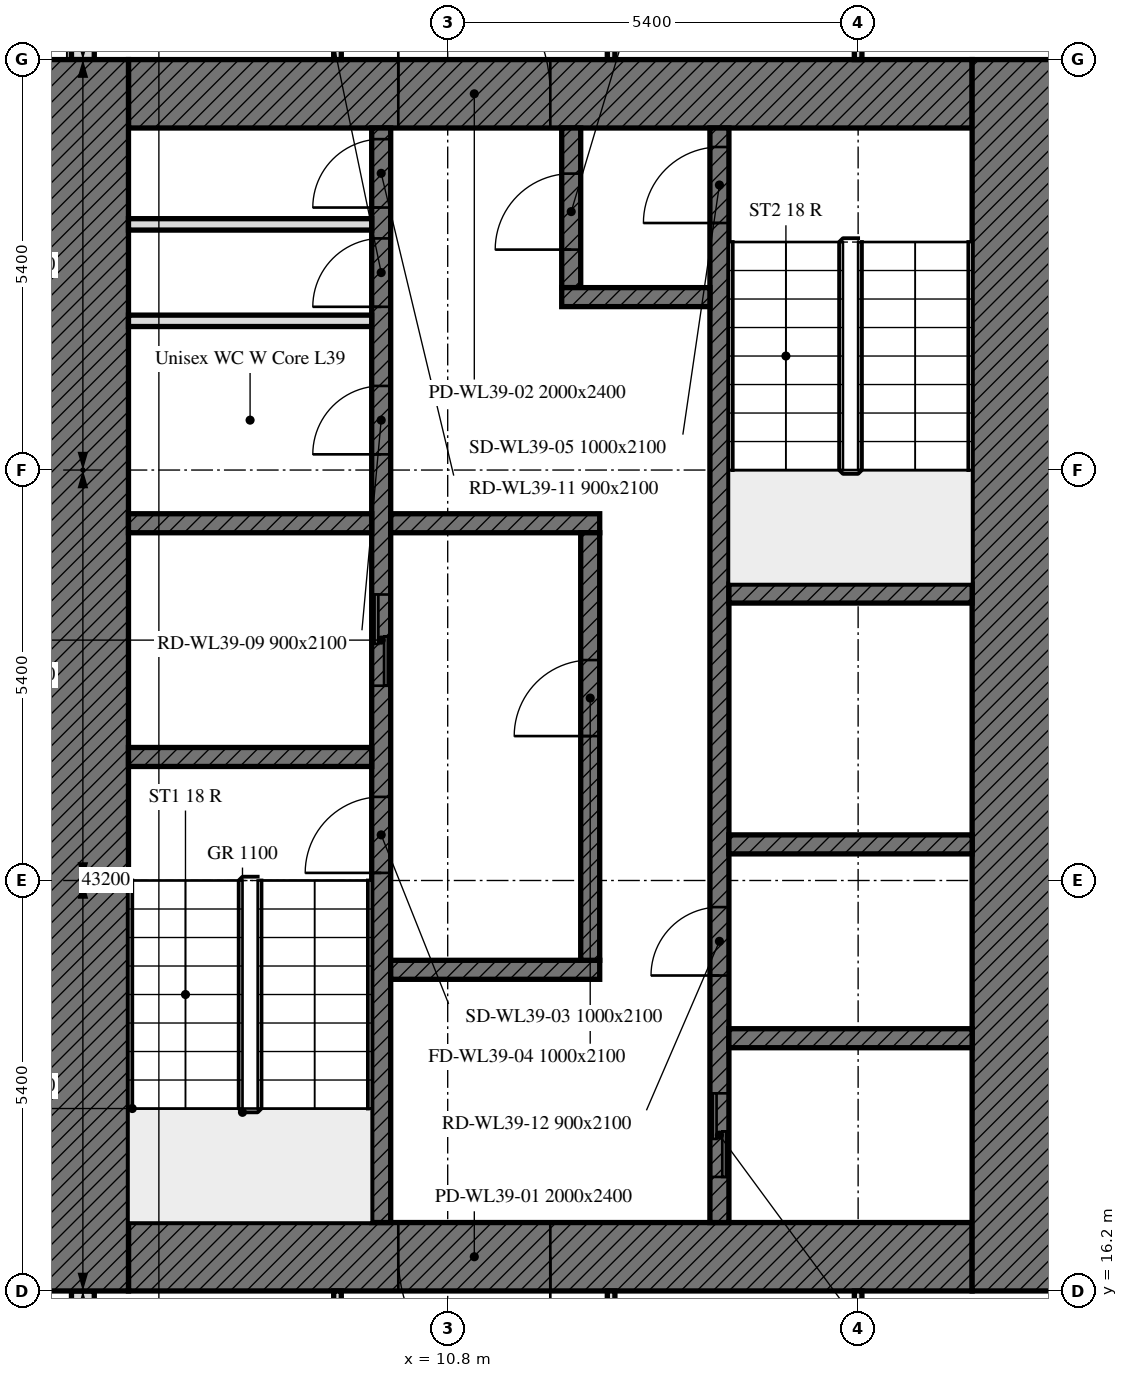
"""IFC4 building model, lengths in metres.
Left out: names, types, materials, properties, quantities, classifications, styles, units other than length and angle.
Written with IfcOpenShell. Run it as: python <this file> out.ifc"""

import sys

from ifc_helpers import new_model, si_unit, direction, frame, frame_2d, origin, place, context, subcontext, project, spatial, rectangle, extrude, element, fill, save


model = new_model("IFC4")
c1 = context("Model", 3, precision=1e-05, world=origin(), true_north=direction((0.0, 1.0)))
c2 = subcontext(c1, "Body", "Model", "MODEL_VIEW")
j1 = project(units=[si_unit("LENGTHUNIT", "METRE"), si_unit("PLANEANGLEUNIT", "RADIAN")], contexts=[c1])
p1 = place(None, origin())
s1 = spatial("IfcSite", under=j1, at=p1, CompositionType="ELEMENT")
p2 = place(p1, origin())
s2 = spatial("IfcBuilding", under=s1, at=p2, CompositionType="ELEMENT")
p3 = place(p2, frame((0.0, 0.0, 166.0)))
s3 = spatial("IfcBuildingStorey", under=s2, at=p3, CompositionType="ELEMENT", Elevation=166.0)
p4 = place(p3, frame((6.0, 37.614, 0.0), z_axis=(0.0, 0.0, 1.0), x_axis=(0.0, -1.0, 0.0)))
e1 = element("IfcWall", 1, at=p4, inside=s3, PredefinedType="SOLIDWALL", context=c2, shape_type="SweptSolid", body=[
    extrude(rectangle(XDim=5.214, YDim=0.3, at=frame_2d((2.607, 0.0))), origin(), (0.0, 0.0, 1.0), 3.0),
])
p5 = place(p4, frame((1.164, 0.0, 0.9)))
e2 = element("IfcOpeningElement", 2, at=p5, cuts=e1, PredefinedType="OPENING", context=c2, shape_type="SweptSolid", body=[
    extrude(rectangle(XDim=1.1, YDim=1.7, at=frame_2d((0.55, 0.85))), frame((0.0, 0.16, 0.0), z_axis=(0.0, -1.0, 0.0), x_axis=(1.0, 0.0, 0.0)), (0.0, 0.0, 1.0), 0.32),
])
p6 = place(p4, frame((2.764, 0.0, 0.9)))
e3 = element("IfcOpeningElement", 3, at=p6, cuts=e1, PredefinedType="OPENING", context=c2, shape_type="SweptSolid", body=[
    extrude(rectangle(XDim=1.1, YDim=1.7, at=frame_2d((0.55, 0.85))), frame((0.0, 0.16, 0.0), z_axis=(0.0, -1.0, 0.0), x_axis=(1.0, 0.0, 0.0)), (0.0, 0.0, 1.0), 0.32),
])
p7 = place(p3, frame((6.0, 16.2, 0.0), z_axis=(0.0, 0.0, 1.0), x_axis=(0.0, -1.0, 0.0)))
e4 = element("IfcWall", 4, at=p7, inside=s3, PredefinedType="SOLIDWALL", context=c2, shape_type="SweptSolid", body=[
    extrude(rectangle(XDim=10.614, YDim=0.3, at=frame_2d((5.307, 0.0))), origin(), (0.0, 0.0, 1.0), 3.0),
])
p8 = place(p7, frame((1.0, 0.0, 0.9)))
e5 = element("IfcOpeningElement", 5, at=p8, cuts=e4, PredefinedType="OPENING", context=c2, shape_type="SweptSolid", body=[
    extrude(rectangle(XDim=3.4, YDim=1.7, at=frame_2d((1.7, 0.85))), frame((0.0, 0.16, 0.0), z_axis=(0.0, -1.0, 0.0), x_axis=(1.0, 0.0, 0.0)), (0.0, 0.0, 1.0), 0.32),
])
p9 = place(p7, frame((6.75, 0.0, 0.9)))
e6 = element("IfcOpeningElement", 6, at=p9, cuts=e4, PredefinedType="OPENING", context=c2, shape_type="SweptSolid", body=[
    extrude(rectangle(XDim=1.1, YDim=1.7, at=frame_2d((0.55, 0.85))), frame((0.0, 0.16, 0.0), z_axis=(0.0, -1.0, 0.0), x_axis=(1.0, 0.0, 0.0)), (0.0, 0.0, 1.0), 0.32),
])
p10 = place(p7, frame((8.35, 0.0, 0.9)))
e7 = element("IfcOpeningElement", 7, at=p10, cuts=e4, PredefinedType="OPENING", context=c2, shape_type="SweptSolid", body=[
    extrude(rectangle(XDim=1.1, YDim=1.7, at=frame_2d((0.55, 0.85))), frame((0.0, 0.16, 0.0), z_axis=(0.0, -1.0, 0.0), x_axis=(1.0, 0.0, 0.0)), (0.0, 0.0, 1.0), 0.32),
])
p11 = place(p3, frame((17.7, 16.65, 0.0), z_axis=(0.0, 0.0, 1.0), x_axis=(-1.0, 0.0, 0.0)))
e8 = element("IfcWall", 8, at=p11, inside=s3, PredefinedType="SOLIDWALL", context=c2, shape_type="SweptSolid", body=[
    extrude(rectangle(XDim=11.1, YDim=0.9, at=frame_2d((5.55, 0.0))), origin(), (0.0, 0.0, 1.0), 3.0),
])
p12 = place(p11, frame((5.55, 0.0, 0.0)))
e9 = element("IfcOpeningElement", 9, at=p12, cuts=e8, PredefinedType="OPENING", context=c2, shape_type="SweptSolid", body=[
    extrude(rectangle(XDim=2.0, YDim=2.4, at=frame_2d((1.0, 1.2))), frame((0.0, 0.45, 0.0), z_axis=(0.0, -1.0, 0.0), x_axis=(1.0, 0.0, 0.0)), (0.0, 0.0, 1.0), 0.9),
])
p13 = place(p3, frame((6.6, 31.95, 0.0), z_axis=(0.0, 0.0, 1.0), x_axis=(1.0, 0.0, 0.0)))
e10 = element("IfcWall", 10, at=p13, inside=s3, PredefinedType="SOLIDWALL", context=c2, shape_type="SweptSolid", body=[
    extrude(rectangle(XDim=11.1, YDim=0.9, at=frame_2d((5.55, 0.0))), origin(), (0.0, 0.0, 1.0), 3.0),
])
p14 = place(p13, frame((3.55, 0.0, 0.0)))
e11 = element("IfcOpeningElement", 11, at=p14, cuts=e10, PredefinedType="OPENING", context=c2, shape_type="SweptSolid", body=[
    extrude(rectangle(XDim=2.0, YDim=2.4, at=frame_2d((1.0, 1.2))), frame((0.0, 0.45, 0.0), z_axis=(0.0, -1.0, 0.0), x_axis=(1.0, 0.0, 0.0)), (0.0, 0.0, 1.0), 0.9),
])
for number, where, z_axis, x_axis in (
    (12, (6.0, 16.2, 0.0), (0.0, 0.0, 1.0), (0.0, 1.0, 0.0)),
    (13, (18.3, 32.4, 0.0), (0.0, 0.0, 1.0), (0.0, -1.0, 0.0)),
):
    element("IfcWall", number, at=place(p3, frame(where, z_axis=z_axis, x_axis=x_axis)), inside=s3, PredefinedType="SOLIDWALL", context=c2, shape_type="SweptSolid", body=[
        extrude(rectangle(XDim=16.2, YDim=1.2, at=frame_2d((8.1, 0.0))), origin(), (0.0, 0.0, 1.0), 3.0),
    ])
p15 = place(p3, frame((9.925, 17.1, 0.0), z_axis=(0.0, 0.0, 1.0), x_axis=(0.0, 1.0, 0.0)))
e14 = element("IfcWall", 14, at=p15, inside=s3, PredefinedType="SOLIDWALL", context=c2, shape_type="SweptSolid", body=[
    extrude(rectangle(XDim=14.4, YDim=0.25, at=frame_2d((7.2, 0.0))), origin(), (0.0, 0.0, 1.0), 3.0),
])
p16 = place(p15, frame((4.6, 0.0, 0.0)))
e15 = element("IfcOpeningElement", 15, at=p16, cuts=e14, PredefinedType="OPENING", context=c2, shape_type="SweptSolid", body=[
    extrude(rectangle(XDim=1.0, YDim=2.1, at=frame_2d((0.5, 1.05))), frame((0.0, 0.125, 0.0), z_axis=(0.0, -1.0, 0.0), x_axis=(1.0, 0.0, 0.0)), (0.0, 0.0, 1.0), 0.25),
])
p17 = place(p15, frame((7.062, 0.0, 0.0)))
e16 = element("IfcOpeningElement", 16, at=p17, cuts=e14, PredefinedType="OPENING", context=c2, shape_type="SweptSolid", body=[
    extrude(rectangle(XDim=1.2, YDim=2.1, at=frame_2d((0.6, 1.05))), frame((0.0, 0.125, 0.0), z_axis=(0.0, -1.0, 0.0), x_axis=(1.0, 0.0, 0.0)), (0.0, 0.0, 1.0), 0.25),
])
p18 = place(p15, frame((10.106, 0.0, 0.0)))
e17 = element("IfcOpeningElement", 17, at=p18, cuts=e14, PredefinedType="OPENING", context=c2, shape_type="SweptSolid", body=[
    extrude(rectangle(XDim=0.9, YDim=2.1, at=frame_2d((0.45, 1.05))), frame((0.0, 0.125, 0.0), z_axis=(0.0, -1.0, 0.0), x_axis=(1.0, 0.0, 0.0)), (0.0, 0.0, 1.0), 0.25),
])
p19 = place(p15, frame((12.048, 0.0, 0.0)))
e18 = element("IfcOpeningElement", 18, at=p19, cuts=e14, PredefinedType="OPENING", context=c2, shape_type="SweptSolid", body=[
    extrude(rectangle(XDim=0.9, YDim=2.1, at=frame_2d((0.45, 1.05))), frame((0.0, 0.125, 0.0), z_axis=(0.0, -1.0, 0.0), x_axis=(1.0, 0.0, 0.0)), (0.0, 0.0, 1.0), 0.25),
])
p20 = place(p15, frame((13.354, 0.0, 0.0)))
e19 = element("IfcOpeningElement", 19, at=p20, cuts=e14, PredefinedType="OPENING", context=c2, shape_type="SweptSolid", body=[
    extrude(rectangle(XDim=0.9, YDim=2.1, at=frame_2d((0.45, 1.05))), frame((0.0, 0.125, 0.0), z_axis=(0.0, -1.0, 0.0), x_axis=(1.0, 0.0, 0.0)), (0.0, 0.0, 1.0), 0.25),
])
p21 = place(p3, frame((14.375, 17.1, 0.0), z_axis=(0.0, 0.0, 1.0), x_axis=(0.0, 1.0, 0.0)))
e20 = element("IfcWall", 20, at=p21, inside=s3, PredefinedType="SOLIDWALL", context=c2, shape_type="SweptSolid", body=[
    extrude(rectangle(XDim=14.4, YDim=0.25, at=frame_2d((7.2, 0.0))), origin(), (0.0, 0.0, 1.0), 3.0),
])
p22 = place(p21, frame((13.15, 0.0, 0.0)))
e21 = element("IfcOpeningElement", 21, at=p22, cuts=e20, PredefinedType="OPENING", context=c2, shape_type="SweptSolid", body=[
    extrude(rectangle(XDim=1.0, YDim=2.1, at=frame_2d((0.5, 1.05))), frame((0.0, 0.125, 0.0), z_axis=(0.0, -1.0, 0.0), x_axis=(1.0, 0.0, 0.0)), (0.0, 0.0, 1.0), 0.25),
])
p23 = place(p21, frame((0.6, 0.0, 0.0)))
e22 = element("IfcOpeningElement", 22, at=p23, cuts=e20, PredefinedType="OPENING", context=c2, shape_type="SweptSolid", body=[
    extrude(rectangle(XDim=1.1, YDim=2.1, at=frame_2d((0.55, 1.05))), frame((0.0, 0.125, 0.0), z_axis=(0.0, -1.0, 0.0), x_axis=(1.0, 0.0, 0.0)), (0.0, 0.0, 1.0), 0.25),
])
p24 = place(p21, frame((3.25, 0.0, 0.0)))
e23 = element("IfcOpeningElement", 23, at=p24, cuts=e20, PredefinedType="OPENING", context=c2, shape_type="SweptSolid", body=[
    extrude(rectangle(XDim=0.9, YDim=2.1, at=frame_2d((0.45, 1.05))), frame((0.0, 0.125, 0.0), z_axis=(0.0, -1.0, 0.0), x_axis=(1.0, 0.0, 0.0)), (0.0, 0.0, 1.0), 0.25),
])
for number, where, z_axis, x_axis in (
    (24, (6.6, 23.225, 0.0), (0.0, 0.0, 1.0), (1.0, 0.0, 0.0)),
    (25, (14.5, 25.375, 0.0), (0.0, 0.0, 1.0), (1.0, 0.0, 0.0)),
    (26, (14.5, 22.075, 0.0), (0.0, 0.0, 1.0), (1.0, 0.0, 0.0)),
    (27, (6.6, 26.3, 0.0), (0.0, 0.0, 1.0), (1.0, 0.0, 0.0)),
):
    element("IfcWall", number, at=place(p3, frame(where, z_axis=z_axis, x_axis=x_axis)), inside=s3, PredefinedType="SOLIDWALL", context=c2, shape_type="SweptSolid", body=[
        extrude(rectangle(XDim=3.2, YDim=0.25, at=frame_2d((1.6, 0.0))), origin(), (0.0, 0.0, 1.0), 3.0),
    ])
for number, where, z_axis, x_axis in (
    (28, (10.05, 26.3, 0.0), (0.0, 0.0, 1.0), (1.0, 0.0, 0.0)),
    (29, (10.05, 20.425, 0.0), (0.0, 0.0, 1.0), (1.0, 0.0, 0.0)),
):
    element("IfcWall", number, at=place(p3, frame(where, z_axis=z_axis, x_axis=x_axis)), inside=s3, PredefinedType="SOLIDWALL", context=c2, shape_type="SweptSolid", body=[
        extrude(rectangle(XDim=2.75, YDim=0.25, at=frame_2d((1.375, 0.0))), origin(), (0.0, 0.0, 1.0), 3.0),
    ])
p25 = place(p3, frame((12.425, 29.4, 0.0), z_axis=(0.0, 0.0, 1.0), x_axis=(0.0, 1.0, 0.0)))
e30 = element("IfcWall", 30, at=p25, inside=s3, PredefinedType="SOLIDWALL", context=c2, shape_type="SweptSolid", body=[
    extrude(rectangle(XDim=2.1, YDim=0.25, at=frame_2d((1.05, 0.0))), origin(), (0.0, 0.0, 1.0), 3.0),
])
p26 = place(p25, frame((0.5, 0.0, 0.0)))
e31 = element("IfcOpeningElement", 31, at=p26, cuts=e30, PredefinedType="OPENING", context=c2, shape_type="SweptSolid", body=[
    extrude(rectangle(XDim=1.0, YDim=2.1, at=frame_2d((0.5, 1.05))), frame((0.0, 0.125, 0.0), z_axis=(0.0, -1.0, 0.0), x_axis=(1.0, 0.0, 0.0)), (0.0, 0.0, 1.0), 0.25),
])
p27 = place(p3, frame((12.3, 29.275, 0.0), z_axis=(0.0, 0.0, 1.0), x_axis=(1.0, 0.0, 0.0)))
e32 = element("IfcWall", 32, at=p27, inside=s3, PredefinedType="SOLIDWALL", context=c2, shape_type="SweptSolid", body=[
    extrude(rectangle(XDim=1.95, YDim=0.25, at=frame_2d((0.975, 0.0))), origin(), (0.0, 0.0, 1.0), 3.0),
])
p28 = place(p3, frame((12.675, 20.55, 0.0), z_axis=(0.0, 0.0, 1.0), x_axis=(0.0, 1.0, 0.0)))
e33 = element("IfcWall", 33, at=p28, inside=s3, PredefinedType="SOLIDWALL", context=c2, shape_type="SweptSolid", body=[
    extrude(rectangle(XDim=5.625, YDim=0.25, at=frame_2d((2.812, 0.0))), origin(), (0.0, 0.0, 1.0), 3.0),
])
p29 = place(p28, frame((2.95, 0.0, 0.0)))
e34 = element("IfcOpeningElement", 34, at=p29, cuts=e33, PredefinedType="OPENING", context=c2, shape_type="SweptSolid", body=[
    extrude(rectangle(XDim=1.0, YDim=2.1, at=frame_2d((0.5, 1.05))), frame((0.0, 0.125, 0.0), z_axis=(0.0, -1.0, 0.0), x_axis=(1.0, 0.0, 0.0)), (0.0, 0.0, 1.0), 0.25),
])
p30 = place(p3, frame((14.5, 19.525, 0.0), z_axis=(0.0, 0.0, 1.0), x_axis=(1.0, 0.0, 0.0)))
e35 = element("IfcWall", 35, at=p30, inside=s3, PredefinedType="SOLIDWALL", context=c2, shape_type="SweptSolid", body=[
    extrude(rectangle(XDim=3.2, YDim=0.25, at=frame_2d((1.6, 0.0))), origin(), (0.0, 0.0, 1.0), 3.0),
])
for number, where, z_axis, x_axis in (
    (36, (6.6, 28.963, 0.0), (0.0, 0.0, 1.0), (1.0, 0.0, 0.0)),
    (37, (6.6, 30.232, 0.0), (0.0, 0.0, 1.0), (1.0, 0.0, 0.0)),
):
    element("IfcWall", number, at=place(p3, frame(where, z_axis=z_axis, x_axis=x_axis)), inside=s3, PredefinedType="PARTITIONING", context=c2, shape_type="SweptSolid", body=[
        extrude(rectangle(XDim=3.2, YDim=0.15, at=frame_2d((1.6, 0.0))), origin(), (0.0, 0.0, 1.0), 3.0),
    ])
for number, where, z_axis, x_axis in (
    (38, (16.2, 35.025, 0.0), (0.0, 0.0, 1.0), (0.0, -1.0, 0.0)),
    (39, (9.35, 35.025, 0.0), (0.0, 0.0, 1.0), (0.0, -1.0, 0.0)),
    (40, (12.95, 32.4, 0.0), (0.0, 0.0, 1.0), (0.0, 1.0, 0.0)),
):
    element("IfcWall", number, at=place(p3, frame(where, z_axis=z_axis, x_axis=x_axis)), inside=s3, PredefinedType="PARTITIONING", context=c2, shape_type="SweptSolid", body=[
        extrude(rectangle(XDim=2.625, YDim=0.1, at=frame_2d((1.312, 0.0))), origin(), (0.0, 0.0, 1.0), 3.0),
    ])
p31 = place(p3, frame((16.2, 16.2, 0.0), z_axis=(0.0, 0.0, 1.0), x_axis=(0.0, -1.0, 0.0)))
e41 = element("IfcWall", 41, at=p31, inside=s3, PredefinedType="PARTITIONING", context=c2, shape_type="SweptSolid", body=[
    extrude(rectangle(XDim=4.955, YDim=0.1, at=frame_2d((2.478, 0.0))), origin(), (0.0, 0.0, 1.0), 2.4),
])
for number, where, z_axis, x_axis in (
    (42, (9.35, 16.2, 0.0), (0.0, 0.0, 1.0), (0.0, -1.0, 0.0)),
    (43, (12.95, 8.175, 0.0), (0.0, 0.0, 1.0), (0.0, 1.0, 0.0)),
):
    element("IfcWall", number, at=place(p3, frame(where, z_axis=z_axis, x_axis=x_axis)), inside=s3, PredefinedType="PARTITIONING", context=c2, shape_type="SweptSolid", body=[
        extrude(rectangle(XDim=8.025, YDim=0.1, at=frame_2d((4.012, 0.0))), origin(), (0.0, 0.0, 1.0), 3.0),
    ])
p32 = place(p12, origin())
e44 = element("IfcDoor", 44, at=p32, inside=s3, OperationType="DOUBLE_DOOR_SINGLE_SWING", PredefinedType="DOOR", context=c2, shape_type="SweptSolid", body=[
    extrude(rectangle(XDim=2.0, YDim=2.4, at=frame_2d((1.0, 1.2))), frame((0.0, 0.025, 0.0), z_axis=(0.0, -1.0, 0.0), x_axis=(1.0, 0.0, 0.0)), (0.0, 0.0, 1.0), 0.05),
])
fill(e9, e44)
p33 = place(p14, origin())
e45 = element("IfcDoor", 45, at=p33, inside=s3, OperationType="DOUBLE_DOOR_SINGLE_SWING", PredefinedType="DOOR", context=c2, shape_type="SweptSolid", body=[
    extrude(rectangle(XDim=2.0, YDim=2.4, at=frame_2d((1.0, 1.2))), frame((0.0, 0.025, 0.0), z_axis=(0.0, -1.0, 0.0), x_axis=(1.0, 0.0, 0.0)), (0.0, 0.0, 1.0), 0.05),
])
fill(e11, e45)
p34 = place(p16, origin())
e46 = element("IfcDoor", 46, at=p34, inside=s3, OperationType="SINGLE_SWING_LEFT", PredefinedType="DOOR", context=c2, shape_type="SweptSolid", body=[
    extrude(rectangle(XDim=1.0, YDim=2.1, at=frame_2d((0.5, 1.05))), frame((0.0, 0.025, 0.0), z_axis=(0.0, -1.0, 0.0), x_axis=(1.0, 0.0, 0.0)), (0.0, 0.0, 1.0), 0.05),
])
fill(e15, e46)
p35 = place(p29, origin())
e47 = element("IfcDoor", 47, at=p35, inside=s3, OperationType="SINGLE_SWING_LEFT", PredefinedType="DOOR", context=c2, shape_type="SweptSolid", body=[
    extrude(rectangle(XDim=1.0, YDim=2.1, at=frame_2d((0.5, 1.05))), frame((0.0, 0.025, 0.0), z_axis=(0.0, -1.0, 0.0), x_axis=(1.0, 0.0, 0.0)), (0.0, 0.0, 1.0), 0.05),
])
fill(e34, e47)
p36 = place(p22, origin())
e48 = element("IfcDoor", 48, at=p36, inside=s3, OperationType="SINGLE_SWING_LEFT", PredefinedType="DOOR", context=c2, shape_type="SweptSolid", body=[
    extrude(rectangle(XDim=1.0, YDim=2.1, at=frame_2d((0.5, 1.05))), frame((0.0, 0.025, 0.0), z_axis=(0.0, -1.0, 0.0), x_axis=(1.0, 0.0, 0.0)), (0.0, 0.0, 1.0), 0.05),
])
fill(e21, e48)
p37 = place(p26, origin())
e49 = element("IfcDoor", 49, at=p37, inside=s3, OperationType="SINGLE_SWING_LEFT", PredefinedType="DOOR", context=c2, shape_type="SweptSolid", body=[
    extrude(rectangle(XDim=1.0, YDim=2.1, at=frame_2d((0.5, 1.05))), frame((0.0, 0.025, 0.0), z_axis=(0.0, -1.0, 0.0), x_axis=(1.0, 0.0, 0.0)), (0.0, 0.0, 1.0), 0.05),
])
fill(e31, e49)
p38 = place(p17, origin())
e50 = element("IfcDoor", 50, at=p38, inside=s3, OperationType="DOUBLE_DOOR_SLIDING", PredefinedType="DOOR", context=c2, shape_type="SweptSolid", body=[
    extrude(rectangle(XDim=1.2, YDim=2.1, at=frame_2d((0.6, 1.05))), frame((0.0, 0.025, 0.0), z_axis=(0.0, -1.0, 0.0), x_axis=(1.0, 0.0, 0.0)), (0.0, 0.0, 1.0), 0.05),
])
fill(e16, e50)
p39 = place(p23, origin())
e51 = element("IfcDoor", 51, at=p39, inside=s3, OperationType="DOUBLE_DOOR_SLIDING", PredefinedType="DOOR", context=c2, shape_type="SweptSolid", body=[
    extrude(rectangle(XDim=1.1, YDim=2.1, at=frame_2d((0.55, 1.05))), frame((0.0, 0.025, 0.0), z_axis=(0.0, -1.0, 0.0), x_axis=(1.0, 0.0, 0.0)), (0.0, 0.0, 1.0), 0.05),
])
fill(e22, e51)
p40 = place(p18, origin())
e52 = element("IfcDoor", 52, at=p40, inside=s3, OperationType="SINGLE_SWING_LEFT", PredefinedType="DOOR", context=c2, shape_type="SweptSolid", body=[
    extrude(rectangle(XDim=0.9, YDim=2.1, at=frame_2d((0.45, 1.05))), frame((0.0, 0.025, 0.0), z_axis=(0.0, -1.0, 0.0), x_axis=(1.0, 0.0, 0.0)), (0.0, 0.0, 1.0), 0.05),
])
fill(e17, e52)
p41 = place(p19, origin())
e53 = element("IfcDoor", 53, at=p41, inside=s3, OperationType="SINGLE_SWING_LEFT", PredefinedType="DOOR", context=c2, shape_type="SweptSolid", body=[
    extrude(rectangle(XDim=0.9, YDim=2.1, at=frame_2d((0.45, 1.05))), frame((0.0, 0.025, 0.0), z_axis=(0.0, -1.0, 0.0), x_axis=(1.0, 0.0, 0.0)), (0.0, 0.0, 1.0), 0.05),
])
fill(e18, e53)
p42 = place(p20, origin())
e54 = element("IfcDoor", 54, at=p42, inside=s3, OperationType="SINGLE_SWING_LEFT", PredefinedType="DOOR", context=c2, shape_type="SweptSolid", body=[
    extrude(rectangle(XDim=0.9, YDim=2.1, at=frame_2d((0.45, 1.05))), frame((0.0, 0.025, 0.0), z_axis=(0.0, -1.0, 0.0), x_axis=(1.0, 0.0, 0.0)), (0.0, 0.0, 1.0), 0.05),
])
fill(e19, e54)
p43 = place(p24, origin())
e55 = element("IfcDoor", 55, at=p43, inside=s3, OperationType="SINGLE_SWING_LEFT", PredefinedType="DOOR", context=c2, shape_type="SweptSolid", body=[
    extrude(rectangle(XDim=0.9, YDim=2.1, at=frame_2d((0.45, 1.05))), frame((0.0, 0.025, 0.0), z_axis=(0.0, -1.0, 0.0), x_axis=(1.0, 0.0, 0.0)), (0.0, 0.0, 1.0), 0.05),
])
fill(e23, e55)
save(model, sys.argv[1])
